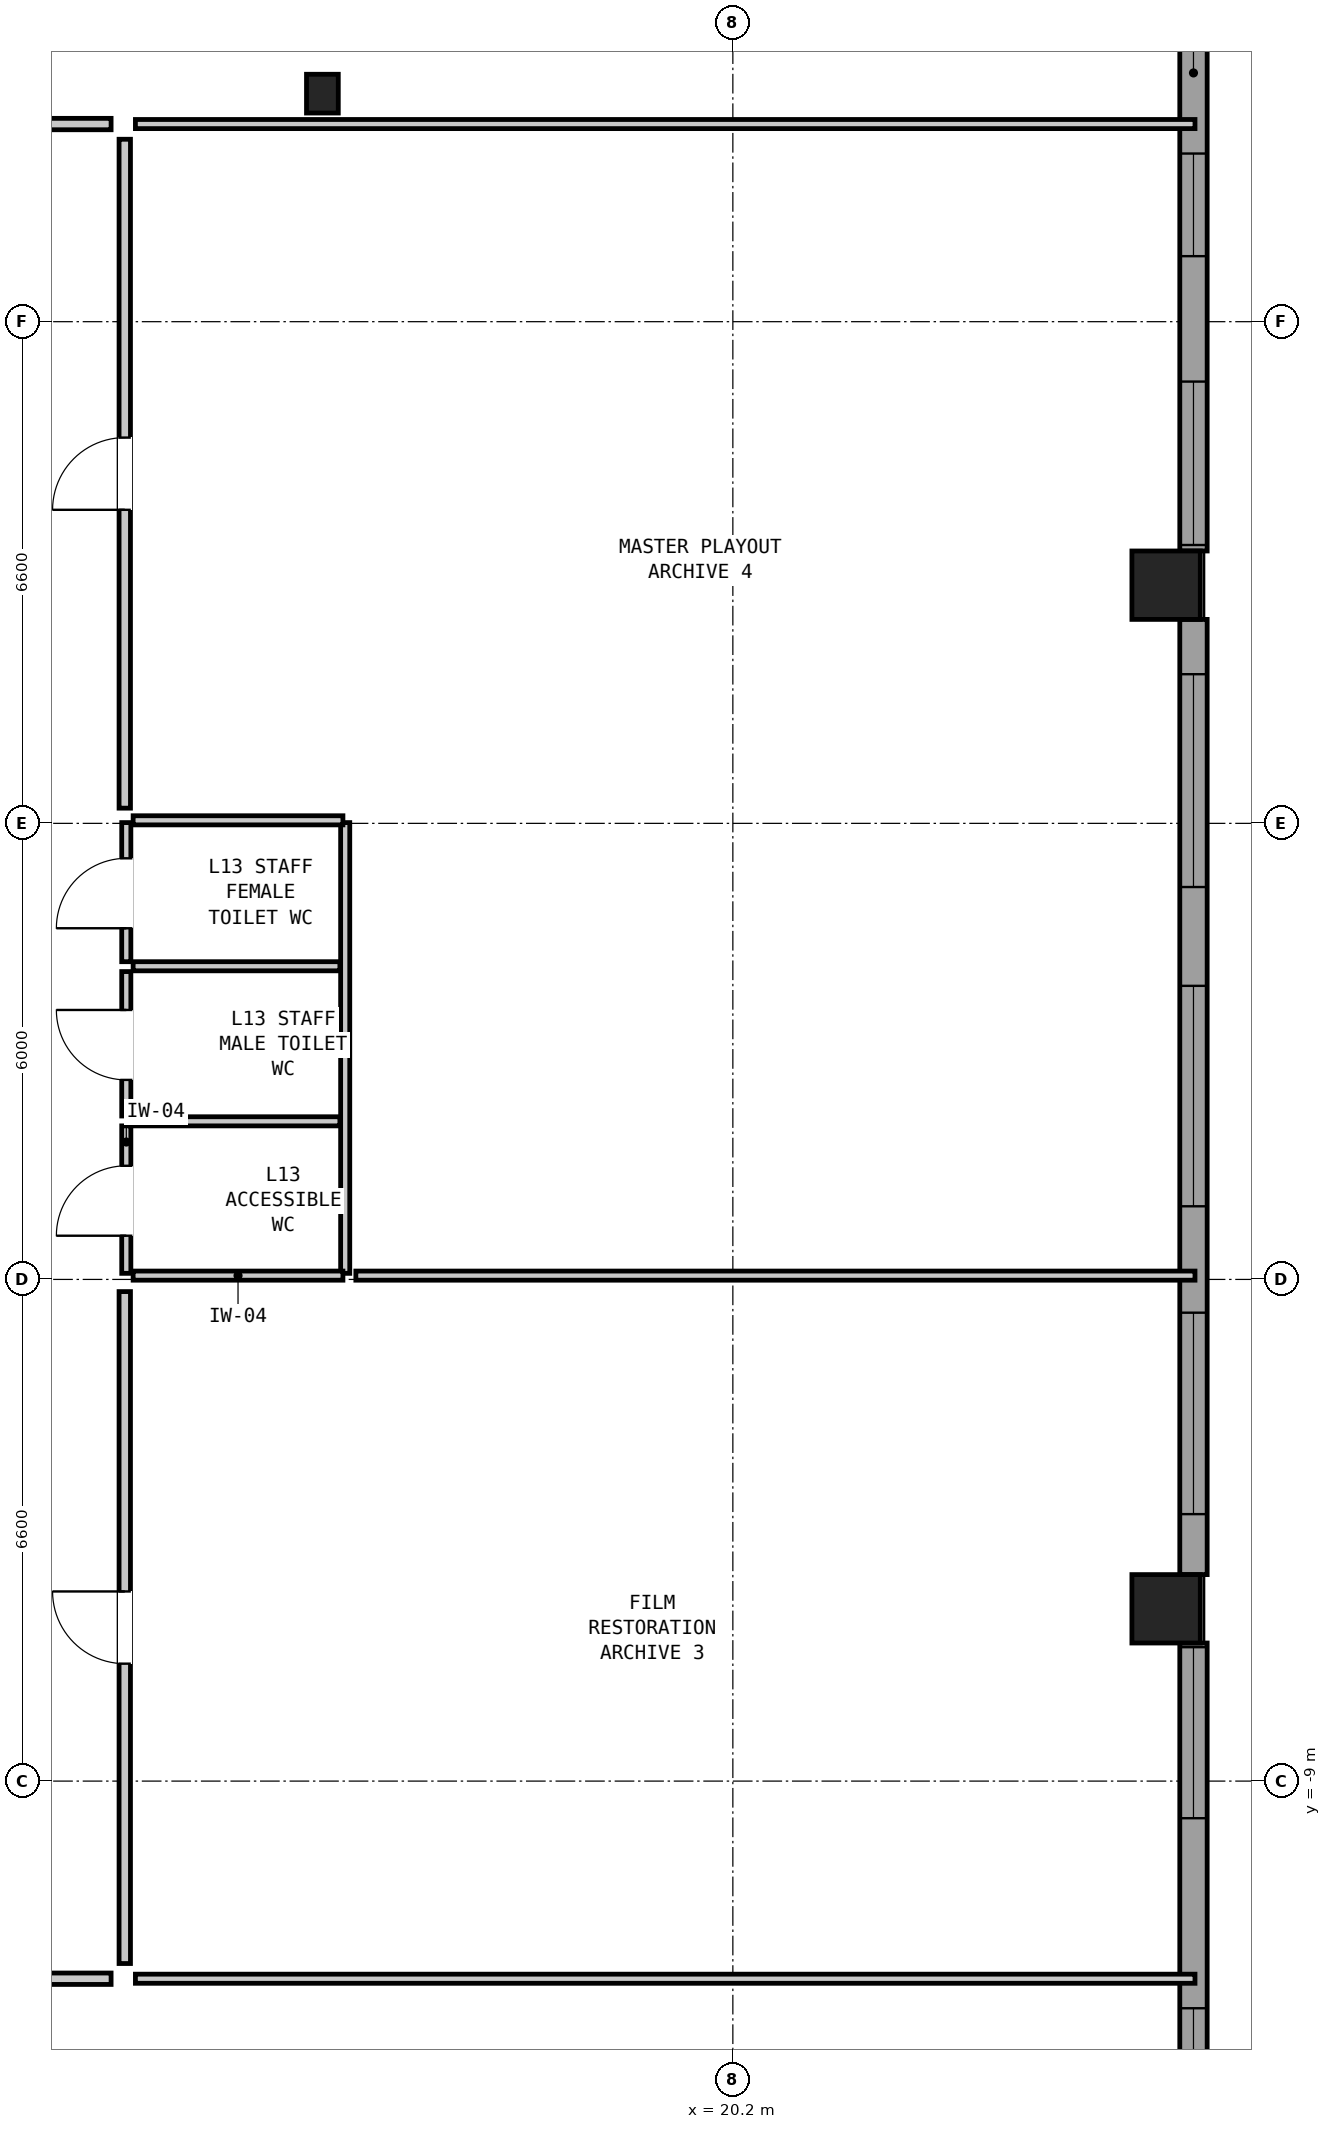
"""IFC4 building model, lengths in metres.
Left out: names, types, materials, properties, quantities, classifications, styles, units other than length and angle.
Written with IfcOpenShell. Run it as: python <this file> out.ifc"""

import sys

from ifc_helpers import new_model, si_unit, direction, frame, frame_2d, origin, origin_2d, place, context, subcontext, project, spatial, rectangle, hollow_rectangle, i_section, extrude, element, fill, save


model = new_model("IFC4")
c1 = context("Model", 3, precision=1e-05, world=origin(), true_north=direction((0.0, 1.0)))
c2 = subcontext(c1, "Body", "Model", "MODEL_VIEW")
j1 = project(units=[si_unit("LENGTHUNIT", "METRE"), si_unit("PLANEANGLEUNIT", "RADIAN")], contexts=[c1])
p1 = place(None, origin())
s1 = spatial("IfcSite", under=j1, at=p1, CompositionType="ELEMENT")
p2 = place(p1, origin())
s2 = spatial("IfcBuilding", under=s1, at=p2, CompositionType="ELEMENT")
p3 = place(p2, frame((0.0, 0.0, 47.45)))
s3 = spatial("IfcBuildingStorey", under=s2, at=p3, CompositionType="ELEMENT", Elevation=47.45)
for number, where, z_axis, x_axis in (
    (1, (25.9, -6.733, 0.0), (0.0, 0.0, 1.0), (0.0, 1.0, 0.0)),
    (2, (25.9, 6.733, 0.0), (0.0, 0.0, 1.0), (0.0, 1.0, 0.0)),
):
    element("IfcColumn", number, at=place(p3, frame(where, z_axis=z_axis, x_axis=x_axis)), inside=s3, PredefinedType="COLUMN", context=c2, shape_type="SweptSolid", body=[
        extrude(hollow_rectangle(XDim=0.9, YDim=0.9, WallThickness=0.055, at=origin_2d()), origin(), (0.0, 0.0, 1.0), 3.05),
    ])
p4 = place(p3, frame((14.8, 13.2, 0.0), z_axis=(0.0, 0.0, 1.0), x_axis=(1.0, 0.0, 0.0)))
e3 = element("IfcColumn", 3, at=p4, inside=s3, PredefinedType="COLUMN", context=c2, shape_type="SweptSolid", body=[
    extrude(i_section(OverallWidth=0.418, OverallDepth=0.51, WebThickness=0.042, FlangeThickness=0.068, at=origin_2d()), origin(), (0.0, 0.0, 1.0), 3.05),
])
p5 = place(p3, frame((26.26, 19.762, 0.0), z_axis=(0.0, 0.0, 1.0), x_axis=(0.0, -1.0, 0.0)))
e4 = element("IfcWall", 4, at=p5, inside=s3, PredefinedType="SOLIDWALL", context=c2, shape_type="SweptSolid", body=[
    extrude(rectangle(XDim=12.579, YDim=0.36, at=frame_2d((6.289, 0.0))), origin(), (0.0, 0.0, 1.0), 2.067),
])
p6 = place(p5, frame((1.8, 0.0, 0.2)))
e5 = element("IfcOpeningElement", 5, at=p6, cuts=e4, PredefinedType="OPENING", context=c2, shape_type="SweptSolid", body=[
    extrude(rectangle(XDim=2.65, YDim=1.05, at=frame_2d((1.325, 0.525))), frame((0.0, 0.192, 0.0), z_axis=(0.0, -1.0, 0.0), x_axis=(1.0, 0.0, 0.0)), (0.0, 0.0, 1.0), 0.384),
])
p7 = place(p5, frame((7.35, 0.0, 0.9)))
e6 = element("IfcOpeningElement", 6, at=p7, cuts=e4, PredefinedType="OPENING", context=c2, shape_type="SweptSolid", body=[
    extrude(rectangle(XDim=1.35, YDim=1.0, at=frame_2d((0.675, 0.5))), frame((0.0, 0.192, 0.0), z_axis=(0.0, -1.0, 0.0), x_axis=(1.0, 0.0, 0.0)), (0.0, 0.0, 1.0), 0.384),
])
p8 = place(p5, frame((10.35, 0.0, 0.2)))
e7 = element("IfcOpeningElement", 7, at=p8, cuts=e4, PredefinedType="OPENING", context=c2, shape_type="SweptSolid", body=[
    extrude(rectangle(XDim=2.15, YDim=1.2, at=frame_2d((1.075, 0.6))), frame((0.0, 0.192, 0.0), z_axis=(0.0, -1.0, 0.0), x_axis=(1.0, 0.0, 0.0)), (0.0, 0.0, 1.0), 0.384),
])
p9 = place(p3, frame((26.26, 6.283, 0.0), z_axis=(0.0, 0.0, 1.0), x_axis=(0.0, -1.0, 0.0)))
e8 = element("IfcWall", 8, at=p9, inside=s3, PredefinedType="SOLIDWALL", context=c2, shape_type="SweptSolid", body=[
    extrude(rectangle(XDim=12.566, YDim=0.36, at=frame_2d((6.283, 0.0))), origin(), (0.0, 0.0, 1.0), 2.067),
])
p10 = place(p9, frame((0.721, 0.0, 0.9)))
e9 = element("IfcOpeningElement", 9, at=p10, cuts=e8, PredefinedType="OPENING", context=c2, shape_type="SweptSolid", body=[
    extrude(rectangle(XDim=2.8, YDim=1.0, at=frame_2d((1.4, 0.5))), frame((0.0, 0.192, 0.0), z_axis=(0.0, -1.0, 0.0), x_axis=(1.0, 0.0, 0.0)), (0.0, 0.0, 1.0), 0.384),
])
p11 = place(p9, frame((4.821, 0.0, 0.2)))
e10 = element("IfcOpeningElement", 10, at=p11, cuts=e8, PredefinedType="OPENING", context=c2, shape_type="SweptSolid", body=[
    extrude(rectangle(XDim=2.9, YDim=0.95, at=frame_2d((1.45, 0.475))), frame((0.0, 0.192, 0.0), z_axis=(0.0, -1.0, 0.0), x_axis=(1.0, 0.0, 0.0)), (0.0, 0.0, 1.0), 0.384),
])
p12 = place(p9, frame((9.121, 0.0, 0.85)))
e11 = element("IfcOpeningElement", 11, at=p12, cuts=e8, PredefinedType="OPENING", context=c2, shape_type="SweptSolid", body=[
    extrude(rectangle(XDim=2.65, YDim=1.05, at=frame_2d((1.325, 0.525))), frame((0.0, 0.192, 0.0), z_axis=(0.0, -1.0, 0.0), x_axis=(1.0, 0.0, 0.0)), (0.0, 0.0, 1.0), 0.384),
])
p13 = place(p3, frame((26.26, -7.183, 0.0), z_axis=(0.0, 0.0, 1.0), x_axis=(0.0, -1.0, 0.0)))
e12 = element("IfcWall", 12, at=p13, inside=s3, PredefinedType="SOLIDWALL", context=c2, shape_type="SweptSolid", body=[
    extrude(rectangle(XDim=12.579, YDim=0.36, at=frame_2d((6.289, 0.0))), origin(), (0.0, 0.0, 1.0), 2.067),
])
p14 = place(p13, frame((0.055, 0.0, 0.2)))
e13 = element("IfcOpeningElement", 13, at=p14, cuts=e12, PredefinedType="OPENING", context=c2, shape_type="SweptSolid", body=[
    extrude(rectangle(XDim=2.25, YDim=1.15, at=frame_2d((1.125, 0.575))), frame((0.0, 0.192, 0.0), z_axis=(0.0, -1.0, 0.0), x_axis=(1.0, 0.0, 0.0)), (0.0, 0.0, 1.0), 0.384),
])
p15 = place(p13, frame((4.805, 0.0, 0.8)))
e14 = element("IfcOpeningElement", 14, at=p15, cuts=e12, PredefinedType="OPENING", context=c2, shape_type="SweptSolid", body=[
    extrude(rectangle(XDim=1.75, YDim=1.1, at=frame_2d((0.875, 0.55))), frame((0.0, 0.192, 0.0), z_axis=(0.0, -1.0, 0.0), x_axis=(1.0, 0.0, 0.0)), (0.0, 0.0, 1.0), 0.384),
])
p16 = place(p13, frame((8.055, 0.0, 0.2)))
e15 = element("IfcOpeningElement", 15, at=p16, cuts=e12, PredefinedType="OPENING", context=c2, shape_type="SweptSolid", body=[
    extrude(rectangle(XDim=2.8, YDim=1.0, at=frame_2d((1.4, 0.5))), frame((0.0, 0.192, 0.0), z_axis=(0.0, -1.0, 0.0), x_axis=(1.0, 0.0, 0.0)), (0.0, 0.0, 1.0), 0.384),
])
p17 = place(p3, frame((12.22, -2.32, 0.0), z_axis=(0.0, 0.0, 1.0), x_axis=(0.0, 1.0, 0.0)))
e16 = element("IfcWall", 16, at=p17, inside=s3, PredefinedType="PARTITIONING", context=c2, shape_type="SweptSolid", body=[
    extrude(rectangle(XDim=1.94, YDim=0.12, at=frame_2d((0.97, 0.0))), origin(), (0.0, 0.0, 1.0), 2.83),
])
p18 = place(p17, frame((0.495, 0.0, 0.0)))
e17 = element("IfcOpeningElement", 17, at=p18, cuts=e16, PredefinedType="OPENING", context=c2, shape_type="SweptSolid", body=[
    extrude(rectangle(XDim=0.92, YDim=2.1, at=frame_2d((0.46, 1.05))), frame((0.0, 0.072, 0.0), z_axis=(0.0, -1.0, 0.0), x_axis=(1.0, 0.0, 0.0)), (0.0, 0.0, 1.0), 0.144),
])
p19 = place(p3, frame((12.22, -0.25, 0.0), z_axis=(0.0, 0.0, 1.0), x_axis=(0.0, 1.0, 0.0)))
e18 = element("IfcWall", 18, at=p19, inside=s3, PredefinedType="PARTITIONING", context=c2, shape_type="SweptSolid", body=[
    extrude(rectangle(XDim=1.9, YDim=0.12, at=frame_2d((0.95, 0.0))), origin(), (0.0, 0.0, 1.0), 2.83),
])
p20 = place(p19, frame((0.475, 0.0, 0.0)))
e19 = element("IfcOpeningElement", 19, at=p20, cuts=e18, PredefinedType="OPENING", context=c2, shape_type="SweptSolid", body=[
    extrude(rectangle(XDim=0.92, YDim=2.1, at=frame_2d((0.46, 1.05))), frame((0.0, 0.072, 0.0), z_axis=(0.0, -1.0, 0.0), x_axis=(1.0, 0.0, 0.0)), (0.0, 0.0, 1.0), 0.144),
])
p21 = place(p3, frame((12.22, 1.78, 0.0), z_axis=(0.0, 0.0, 1.0), x_axis=(0.0, 1.0, 0.0)))
e20 = element("IfcWall", 20, at=p21, inside=s3, PredefinedType="PARTITIONING", context=c2, shape_type="SweptSolid", body=[
    extrude(rectangle(XDim=1.83, YDim=0.12, at=frame_2d((0.915, 0.0))), origin(), (0.0, 0.0, 1.0), 2.83),
])
p22 = place(p21, frame((0.44, 0.0, 0.0)))
e21 = element("IfcOpeningElement", 21, at=p22, cuts=e20, PredefinedType="OPENING", context=c2, shape_type="SweptSolid", body=[
    extrude(rectangle(XDim=0.92, YDim=2.1, at=frame_2d((0.46, 1.05))), frame((0.0, 0.072, 0.0), z_axis=(0.0, -1.0, 0.0), x_axis=(1.0, 0.0, 0.0)), (0.0, 0.0, 1.0), 0.144),
])
p23 = place(p3, frame((15.1, -2.32, 0.0), z_axis=(0.0, 0.0, 1.0), x_axis=(0.0, 1.0, 0.0)))
e22 = element("IfcWall", 22, at=p23, inside=s3, PredefinedType="PARTITIONING", context=c2, shape_type="SweptSolid", body=[
    extrude(rectangle(XDim=5.93, YDim=0.12, at=frame_2d((2.965, 0.0))), origin(), (0.0, 0.0, 1.0), 2.83),
])
for number, where, z_axis, x_axis in (
    (23, (12.31, -2.35, 0.0), (0.0, 0.0, 1.0), (1.0, 0.0, 0.0)),
    (24, (12.31, 3.64, 0.0), (0.0, 0.0, 1.0), (1.0, 0.0, 0.0)),
):
    element("IfcWall", number, at=place(p3, frame(where, z_axis=z_axis, x_axis=x_axis)), inside=s3, PredefinedType="PARTITIONING", context=c2, shape_type="SweptSolid", body=[
        extrude(rectangle(XDim=2.76, YDim=0.12, at=frame_2d((1.38, 0.0))), origin(), (0.0, 0.0, 1.0), 1.799),
    ])
for number, where, z_axis, x_axis in (
    (25, (12.31, -0.32, 0.0), (0.0, 0.0, 1.0), (1.0, 0.0, 0.0)),
    (26, (12.31, 1.72, 0.0), (0.0, 0.0, 1.0), (1.0, 0.0, 0.0)),
):
    element("IfcWall", number, at=place(p3, frame(where, z_axis=z_axis, x_axis=x_axis)), inside=s3, PredefinedType="PARTITIONING", context=c2, shape_type="SweptSolid", body=[
        extrude(rectangle(XDim=2.72, YDim=0.12, at=frame_2d((1.36, 0.0))), origin(), (0.0, 0.0, 1.0), 2.83),
    ])
p24 = place(p3, frame((12.34, 12.8, 0.0), z_axis=(0.0, 0.0, 1.0), x_axis=(1.0, 0.0, 0.0)))
e27 = element("IfcWall", 27, at=p24, inside=s3, PredefinedType="PARTITIONING", context=c2, shape_type="SweptSolid", body=[
    extrude(rectangle(XDim=13.94, YDim=0.12, at=frame_2d((6.97, 0.0))), origin(), (0.0, 0.0, 1.0), 2.83),
])
p25 = place(p3, frame((12.34, -11.6, 0.0), z_axis=(0.0, 0.0, 1.0), x_axis=(1.0, 0.0, 0.0)))
e28 = element("IfcWall", 28, at=p25, inside=s3, PredefinedType="PARTITIONING", context=c2, shape_type="SweptSolid", body=[
    extrude(rectangle(XDim=13.94, YDim=0.12, at=frame_2d((6.97, 0.0))), origin(), (0.0, 0.0, 1.0), 2.274),
])
p26 = place(p3, frame((15.24, -2.35, 0.0), z_axis=(0.0, 0.0, 1.0), x_axis=(1.0, 0.0, 0.0)))
e29 = element("IfcWall", 29, at=p26, inside=s3, PredefinedType="PARTITIONING", context=c2, shape_type="SweptSolid", body=[
    extrude(rectangle(XDim=11.04, YDim=0.12, at=frame_2d((5.52, 0.0))), origin(), (0.0, 0.0, 1.0), 1.799),
])
p27 = place(p3, frame((6.68, 12.8, 0.0), z_axis=(0.0, 0.0, 1.0), x_axis=(1.0, 0.0, 0.0)))
e30 = element("IfcWall", 30, at=p27, inside=s3, PredefinedType="PARTITIONING", context=c2, shape_type="SweptSolid", body=[
    extrude(rectangle(XDim=5.34, YDim=0.15, at=frame_2d((2.67, 0.0))), origin(), (0.0, 0.0, 1.0), 2.83),
])
p28 = place(p27, frame((1.395, 0.0, 0.0)))
e31 = element("IfcOpeningElement", 31, at=p28, cuts=e30, PredefinedType="OPENING", context=c2, shape_type="SweptSolid", body=[
    extrude(rectangle(XDim=0.95, YDim=2.1, at=frame_2d((0.475, 1.05))), frame((0.0, 0.087, 0.0), z_axis=(0.0, -1.0, 0.0), x_axis=(1.0, 0.0, 0.0)), (0.0, 0.0, 1.0), 0.174),
])
p29 = place(p3, frame((7.68, -11.6, 0.0), z_axis=(0.0, 0.0, 1.0), x_axis=(1.0, 0.0, 0.0)))
e32 = element("IfcWall", 32, at=p29, inside=s3, PredefinedType="PARTITIONING", context=c2, shape_type="SweptSolid", body=[
    extrude(rectangle(XDim=4.34, YDim=0.15, at=frame_2d((2.17, 0.0))), origin(), (0.0, 0.0, 1.0), 2.274),
])
p30 = place(p29, frame((2.095, 0.0, 0.0)))
e33 = element("IfcOpeningElement", 33, at=p30, cuts=e32, PredefinedType="OPENING", context=c2, shape_type="SweptSolid", body=[
    extrude(rectangle(XDim=0.95, YDim=2.1, at=frame_2d((0.475, 1.05))), frame((0.0, 0.087, 0.0), z_axis=(0.0, -1.0, 0.0), x_axis=(1.0, 0.0, 0.0)), (0.0, 0.0, 1.0), 0.174),
])
p31 = place(p3, frame((12.2, -11.4, 0.0), z_axis=(0.0, 0.0, 1.0), x_axis=(0.0, 1.0, 0.0)))
e34 = element("IfcWall", 34, at=p31, inside=s3, PredefinedType="PARTITIONING", context=c2, shape_type="SweptSolid", body=[
    extrude(rectangle(XDim=8.84, YDim=0.15, at=frame_2d((4.42, 0.0))), origin(), (0.0, 0.0, 1.0), 2.83),
])
p32 = place(p31, frame((3.945, 0.0, 0.0)))
e35 = element("IfcOpeningElement", 35, at=p32, cuts=e34, PredefinedType="OPENING", context=c2, shape_type="SweptSolid", body=[
    extrude(rectangle(XDim=0.95, YDim=2.1, at=frame_2d((0.475, 1.05))), frame((0.0, 0.087, 0.0), z_axis=(0.0, -1.0, 0.0), x_axis=(1.0, 0.0, 0.0)), (0.0, 0.0, 1.0), 0.174),
])
p33 = place(p3, frame((12.2, 3.8, 0.0), z_axis=(0.0, 0.0, 1.0), x_axis=(0.0, 1.0, 0.0)))
e36 = element("IfcWall", 36, at=p33, inside=s3, PredefinedType="PARTITIONING", context=c2, shape_type="SweptSolid", body=[
    extrude(rectangle(XDim=8.8, YDim=0.15, at=frame_2d((4.4, 0.0))), origin(), (0.0, 0.0, 1.0), 2.83),
])
p34 = place(p33, frame((3.925, 0.0, 0.0)))
e37 = element("IfcOpeningElement", 37, at=p34, cuts=e36, PredefinedType="OPENING", context=c2, shape_type="SweptSolid", body=[
    extrude(rectangle(XDim=0.95, YDim=2.1, at=frame_2d((0.475, 1.05))), frame((0.0, 0.087, 0.0), z_axis=(0.0, -1.0, 0.0), x_axis=(1.0, 0.0, 0.0)), (0.0, 0.0, 1.0), 0.174),
])
p35 = place(p7, origin())
e38 = element("IfcWindow", 38, at=p35, inside=s3, PartitioningType="SINGLE_PANEL", PredefinedType="WINDOW", context=c2, shape_type="SweptSolid", body=[
    extrude(rectangle(XDim=1.35, YDim=1.0, at=frame_2d((0.675, 0.5))), frame((0.0, 0.03, 0.0), z_axis=(0.0, -1.0, 0.0), x_axis=(1.0, 0.0, 0.0)), (0.0, 0.0, 1.0), 0.06),
])
fill(e6, e38)
p36 = place(p8, origin())
e39 = element("IfcWindow", 39, at=p36, inside=s3, PartitioningType="SINGLE_PANEL", PredefinedType="WINDOW", context=c2, shape_type="SweptSolid", body=[
    extrude(rectangle(XDim=2.15, YDim=1.2, at=frame_2d((1.075, 0.6))), frame((0.0, 0.03, 0.0), z_axis=(0.0, -1.0, 0.0), x_axis=(1.0, 0.0, 0.0)), (0.0, 0.0, 1.0), 0.06),
])
fill(e7, e39)
p37 = place(p10, origin())
e40 = element("IfcWindow", 40, at=p37, inside=s3, PartitioningType="SINGLE_PANEL", PredefinedType="WINDOW", context=c2, shape_type="SweptSolid", body=[
    extrude(rectangle(XDim=2.8, YDim=1.0, at=frame_2d((1.4, 0.5))), frame((0.0, 0.03, 0.0), z_axis=(0.0, -1.0, 0.0), x_axis=(1.0, 0.0, 0.0)), (0.0, 0.0, 1.0), 0.06),
])
fill(e9, e40)
p38 = place(p11, origin())
e41 = element("IfcWindow", 41, at=p38, inside=s3, PartitioningType="SINGLE_PANEL", PredefinedType="WINDOW", context=c2, shape_type="SweptSolid", body=[
    extrude(rectangle(XDim=2.9, YDim=0.95, at=frame_2d((1.45, 0.475))), frame((0.0, 0.03, 0.0), z_axis=(0.0, -1.0, 0.0), x_axis=(1.0, 0.0, 0.0)), (0.0, 0.0, 1.0), 0.06),
])
fill(e10, e41)
p39 = place(p12, origin())
e42 = element("IfcWindow", 42, at=p39, inside=s3, PartitioningType="SINGLE_PANEL", PredefinedType="WINDOW", context=c2, shape_type="SweptSolid", body=[
    extrude(rectangle(XDim=2.65, YDim=1.05, at=frame_2d((1.325, 0.525))), frame((0.0, 0.03, 0.0), z_axis=(0.0, -1.0, 0.0), x_axis=(1.0, 0.0, 0.0)), (0.0, 0.0, 1.0), 0.06),
])
fill(e11, e42)
p40 = place(p14, origin())
e43 = element("IfcWindow", 43, at=p40, inside=s3, PartitioningType="SINGLE_PANEL", PredefinedType="WINDOW", context=c2, shape_type="SweptSolid", body=[
    extrude(rectangle(XDim=2.25, YDim=1.15, at=frame_2d((1.125, 0.575))), frame((0.0, 0.03, 0.0), z_axis=(0.0, -1.0, 0.0), x_axis=(1.0, 0.0, 0.0)), (0.0, 0.0, 1.0), 0.06),
])
fill(e13, e43)
p41 = place(p15, origin())
e44 = element("IfcWindow", 44, at=p41, inside=s3, PartitioningType="SINGLE_PANEL", PredefinedType="WINDOW", context=c2, shape_type="SweptSolid", body=[
    extrude(rectangle(XDim=1.75, YDim=1.1, at=frame_2d((0.875, 0.55))), frame((0.0, 0.03, 0.0), z_axis=(0.0, -1.0, 0.0), x_axis=(1.0, 0.0, 0.0)), (0.0, 0.0, 1.0), 0.06),
])
fill(e14, e44)
p42 = place(p18, origin())
e45 = element("IfcDoor", 45, at=p42, inside=s3, OperationType="SINGLE_SWING_LEFT", PredefinedType="DOOR", context=c2, shape_type="SweptSolid", body=[
    extrude(rectangle(XDim=0.92, YDim=2.1, at=frame_2d((0.46, 1.05))), frame((0.0, 0.025, 0.0), z_axis=(0.0, -1.0, 0.0), x_axis=(1.0, 0.0, 0.0)), (0.0, 0.0, 1.0), 0.05),
])
fill(e17, e45)
p43 = place(p20, origin())
e46 = element("IfcDoor", 46, at=p43, inside=s3, OperationType="SINGLE_SWING_RIGHT", PredefinedType="DOOR", context=c2, shape_type="SweptSolid", body=[
    extrude(rectangle(XDim=0.92, YDim=2.1, at=frame_2d((0.46, 1.05))), frame((0.0, 0.025, 0.0), z_axis=(0.0, -1.0, 0.0), x_axis=(1.0, 0.0, 0.0)), (0.0, 0.0, 1.0), 0.05),
])
fill(e19, e46)
p44 = place(p22, origin())
e47 = element("IfcDoor", 47, at=p44, inside=s3, OperationType="SINGLE_SWING_LEFT", PredefinedType="DOOR", context=c2, shape_type="SweptSolid", body=[
    extrude(rectangle(XDim=0.92, YDim=2.1, at=frame_2d((0.46, 1.05))), frame((0.0, 0.025, 0.0), z_axis=(0.0, -1.0, 0.0), x_axis=(1.0, 0.0, 0.0)), (0.0, 0.0, 1.0), 0.05),
])
fill(e21, e47)
p45 = place(p32, origin())
e48 = element("IfcDoor", 48, at=p45, inside=s3, OperationType="SINGLE_SWING_RIGHT", PredefinedType="DOOR", context=c2, shape_type="SweptSolid", body=[
    extrude(rectangle(XDim=0.95, YDim=2.1, at=frame_2d((0.475, 1.05))), frame((0.0, 0.025, 0.0), z_axis=(0.0, -1.0, 0.0), x_axis=(1.0, 0.0, 0.0)), (0.0, 0.0, 1.0), 0.05),
])
fill(e35, e48)
p46 = place(p34, origin())
e49 = element("IfcDoor", 49, at=p46, inside=s3, OperationType="SINGLE_SWING_LEFT", PredefinedType="DOOR", context=c2, shape_type="SweptSolid", body=[
    extrude(rectangle(XDim=0.95, YDim=2.1, at=frame_2d((0.475, 1.05))), frame((0.0, 0.025, 0.0), z_axis=(0.0, -1.0, 0.0), x_axis=(1.0, 0.0, 0.0)), (0.0, 0.0, 1.0), 0.05),
])
fill(e37, e49)
save(model, sys.argv[1])
